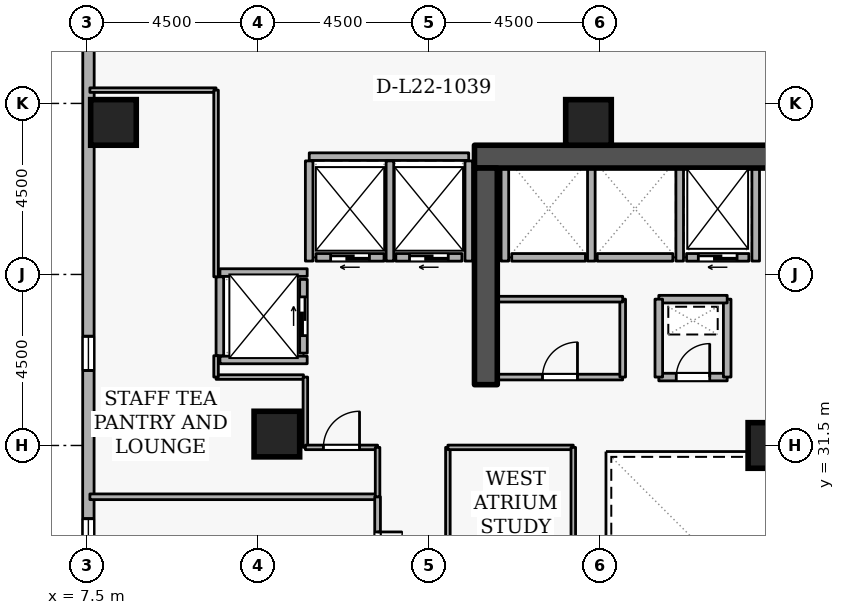
"""IFC4 building model, lengths in metres.
Left out: names, types, materials, properties, quantities, classifications, styles, units other than length and angle.
Written with IfcOpenShell. Run it as: python <this file> out.ifc"""

import sys

from ifc_helpers import new_model, si_unit, direction, frame, frame_2d, origin, origin_2d, place, context, subcontext, project, spatial, rectangle, extrude, element, fill, save


model = new_model("IFC4")
c1 = context("Model", 3, precision=1e-05, world=origin(), true_north=direction((0.0, 1.0)))
c2 = subcontext(c1, "Body", "Model", "MODEL_VIEW")
j1 = project(units=[si_unit("LENGTHUNIT", "METRE"), si_unit("PLANEANGLEUNIT", "RADIAN")], contexts=[c1])
p1 = place(None, origin())
s1 = spatial("IfcSite", under=j1, at=p1, CompositionType="ELEMENT")
p2 = place(p1, origin())
s2 = spatial("IfcBuilding", under=s1, at=p2, CompositionType="ELEMENT")
p3 = place(p2, frame((0.0, 0.0, 87.3)))
s3 = spatial("IfcBuildingStorey", under=s2, at=p3, CompositionType="ELEMENT", Elevation=87.3)
p4 = place(p3, frame((17.7, 39.1, 0.0), z_axis=(0.0, 0.0, 1.0), x_axis=(1.0, 0.0, 0.0)))
e1 = element("IfcWall", 1, at=p4, inside=s3, PredefinedType="SHEAR", context=c2, shape_type="SweptSolid", body=[
    extrude(rectangle(XDim=15.6, YDim=0.6, at=frame_2d((7.8, 0.0))), origin(), (0.0, 0.0, 1.0), 3.6),
])
p5 = place(p3, frame((18.0, 33.1, 0.0), z_axis=(0.0, 0.0, 1.0), x_axis=(0.0, 1.0, 0.0)))
e2 = element("IfcWall", 2, at=p5, inside=s3, PredefinedType="SHEAR", context=c2, shape_type="SweptSolid", body=[
    extrude(rectangle(XDim=5.7, YDim=0.6, at=frame_2d((2.85, 0.0))), origin(), (0.0, 0.0, 1.0), 3.6),
])
for number, where, z_axis, x_axis in (
    (3, (8.2, 40.0, 0.0), (0.0, 0.0, 1.0), (1.0, 0.0, 0.0)),
    (4, (12.5, 31.8, 0.0), (0.0, 0.0, 1.0), (1.0, 0.0, 0.0)),
    (5, (20.7, 40.0, 0.0), (0.0, 0.0, 1.0), (1.0, 0.0, 0.0)),
    (6, (25.5, 31.5, 0.0), (0.0, 0.0, 1.0), (1.0, 0.0, 0.0)),
):
    element("IfcColumn", number, at=place(p3, frame(where, z_axis=z_axis, x_axis=x_axis)), inside=s3, PredefinedType="COLUMN", context=c2, shape_type="SweptSolid", body=[
        extrude(rectangle(XDim=1.2, YDim=1.2, at=origin_2d()), origin(), (0.0, 0.0, 1.0), 3.6),
    ])
p6 = place(p3, frame((7.544, 45.774, 0.0), z_axis=(0.0, 0.0, 1.0), x_axis=(-0.000243032466, -0.999999970468, 0.0)))
e7 = element("IfcWall", 7, at=p6, inside=s3, PredefinedType="STANDARD", context=c2, shape_type="SweptSolid", body=[
    extrude(rectangle(XDim=34.155, YDim=0.3, at=frame_2d((17.078, 0.0))), origin(), (0.0, 0.0, 1.0), 2.7),
])
p7 = place(p6, frame((1.8, 0.0, 0.72)))
e8 = element("IfcOpeningElement", 8, at=p7, cuts=e7, PredefinedType="OPENING", context=c2, shape_type="SweptSolid", body=[
    extrude(rectangle(XDim=0.9, YDim=1.75, at=frame_2d((0.45, 0.875))), frame((0.0, 0.16, 0.0), z_axis=(0.0, -1.0, 0.0), x_axis=(1.0, 0.0, 0.0)), (0.0, 0.0, 1.0), 0.32),
])
p8 = place(p6, frame((11.4, 0.0, 0.72)))
e9 = element("IfcOpeningElement", 9, at=p8, cuts=e7, PredefinedType="OPENING", context=c2, shape_type="SweptSolid", body=[
    extrude(rectangle(XDim=0.9, YDim=1.75, at=frame_2d((0.45, 0.875))), frame((0.0, 0.16, 0.0), z_axis=(0.0, -1.0, 0.0), x_axis=(1.0, 0.0, 0.0)), (0.0, 0.0, 1.0), 0.32),
])
p9 = place(p6, frame((16.2, 0.0, 0.72)))
e10 = element("IfcOpeningElement", 10, at=p9, cuts=e7, PredefinedType="OPENING", context=c2, shape_type="SweptSolid", body=[
    extrude(rectangle(XDim=0.9, YDim=1.75, at=frame_2d((0.45, 0.875))), frame((0.0, 0.16, 0.0), z_axis=(0.0, -1.0, 0.0), x_axis=(1.0, 0.0, 0.0)), (0.0, 0.0, 1.0), 0.32),
])
p10 = place(p6, frame((21.0, 0.0, 0.72)))
e11 = element("IfcOpeningElement", 11, at=p10, cuts=e7, PredefinedType="OPENING", context=c2, shape_type="SweptSolid", body=[
    extrude(rectangle(XDim=0.9, YDim=1.75, at=frame_2d((0.45, 0.875))), frame((0.0, 0.16, 0.0), z_axis=(0.0, -1.0, 0.0), x_axis=(1.0, 0.0, 0.0)), (0.0, 0.0, 1.0), 0.32),
])
p11 = place(p6, frame((25.8, 0.0, 0.72)))
e12 = element("IfcOpeningElement", 12, at=p11, cuts=e7, PredefinedType="OPENING", context=c2, shape_type="SweptSolid", body=[
    extrude(rectangle(XDim=0.9, YDim=1.75, at=frame_2d((0.45, 0.875))), frame((0.0, 0.16, 0.0), z_axis=(0.0, -1.0, 0.0), x_axis=(1.0, 0.0, 0.0)), (0.0, 0.0, 1.0), 0.32),
])
p12 = place(p3, frame((24.92, 36.45, 0.0), z_axis=(0.0, 0.0, 1.0), x_axis=(-1.0, 0.0, 0.0)))
e13 = element("IfcWall", 13, at=p12, inside=s3, PredefinedType="STANDARD", context=c2, shape_type="SweptSolid", body=[
    extrude(rectangle(XDim=1.64, YDim=0.2, at=frame_2d((0.82, 0.0))), origin(), (0.0, 0.0, 1.0), 3.34),
])
p13 = place(p12, frame((0.31, 0.0, 0.0)))
e14 = element("IfcOpeningElement", 14, at=p13, cuts=e13, PredefinedType="OPENING", context=c2, shape_type="SweptSolid", body=[
    extrude(rectangle(XDim=1.02, YDim=2.06, at=frame_2d((0.51, 1.03))), frame((0.0, 0.11, 0.0), z_axis=(0.0, -1.0, 0.0), x_axis=(1.0, 0.0, 0.0)), (0.0, 0.0, 1.0), 0.22),
])
p14 = place(p3, frame((22.92, 36.45, 0.0), z_axis=(0.0, 0.0, 1.0), x_axis=(-1.0, 0.0, 0.0)))
e15 = element("IfcWall", 15, at=p14, inside=s3, PredefinedType="STANDARD", context=c2, shape_type="SweptSolid", body=[
    extrude(rectangle(XDim=1.99, YDim=0.2, at=frame_2d((0.995, 0.0))), origin(), (0.0, 0.0, 1.0), 3.34),
])
p15 = place(p3, frame((20.62, 36.45, 0.0), z_axis=(0.0, 0.0, 1.0), x_axis=(-1.0, 0.0, 0.0)))
e16 = element("IfcWall", 16, at=p15, inside=s3, PredefinedType="STANDARD", context=c2, shape_type="SweptSolid", body=[
    extrude(rectangle(XDim=1.94, YDim=0.2, at=frame_2d((0.97, 0.0))), origin(), (0.0, 0.0, 1.0), 3.34),
])
p16 = place(p3, frame((17.37, 36.45, 0.0), z_axis=(0.0, 0.0, 1.0), x_axis=(-1.0, 0.0, 0.0)))
e17 = element("IfcWall", 17, at=p16, inside=s3, PredefinedType="STANDARD", context=c2, shape_type="SweptSolid", body=[
    extrude(rectangle(XDim=1.74, YDim=0.2, at=frame_2d((0.87, 0.0))), origin(), (0.0, 0.0, 1.0), 3.34),
])
p17 = place(p16, frame((0.36, 0.0, 0.0)))
e18 = element("IfcOpeningElement", 18, at=p17, cuts=e17, PredefinedType="OPENING", context=c2, shape_type="SweptSolid", body=[
    extrude(rectangle(XDim=1.02, YDim=2.06, at=frame_2d((0.51, 1.03))), frame((0.0, 0.11, 0.0), z_axis=(0.0, -1.0, 0.0), x_axis=(1.0, 0.0, 0.0)), (0.0, 0.0, 1.0), 0.22),
])
p18 = place(p3, frame((15.32, 36.45, 0.0), z_axis=(0.0, 0.0, 1.0), x_axis=(-1.0, 0.0, 0.0)))
e19 = element("IfcWall", 19, at=p18, inside=s3, PredefinedType="STANDARD", context=c2, shape_type="SweptSolid", body=[
    extrude(rectangle(XDim=1.79, YDim=0.2, at=frame_2d((0.895, 0.0))), origin(), (0.0, 0.0, 1.0), 3.34),
])
p19 = place(p18, frame((0.385, 0.0, 0.0)))
e20 = element("IfcOpeningElement", 20, at=p19, cuts=e19, PredefinedType="OPENING", context=c2, shape_type="SweptSolid", body=[
    extrude(rectangle(XDim=1.02, YDim=2.06, at=frame_2d((0.51, 1.03))), frame((0.0, 0.11, 0.0), z_axis=(0.0, -1.0, 0.0), x_axis=(1.0, 0.0, 0.0)), (0.0, 0.0, 1.0), 0.22),
])
p20 = place(p3, frame((13.2, 33.93, 0.0), z_axis=(0.0, 0.0, 1.0), x_axis=(0.0, 1.0, 0.0)))
e21 = element("IfcWall", 21, at=p20, inside=s3, PredefinedType="STANDARD", context=c2, shape_type="SweptSolid", body=[
    extrude(rectangle(XDim=1.94, YDim=0.2, at=frame_2d((0.97, 0.0))), origin(), (0.0, 0.0, 1.0), 3.34),
])
p21 = place(p20, frame((0.46, 0.0, 0.0)))
e22 = element("IfcOpeningElement", 22, at=p21, cuts=e21, PredefinedType="OPENING", context=c2, shape_type="SweptSolid", body=[
    extrude(rectangle(XDim=1.02, YDim=2.06, at=frame_2d((0.51, 1.03))), frame((0.0, 0.11, 0.0), z_axis=(0.0, -1.0, 0.0), x_axis=(1.0, 0.0, 0.0)), (0.0, 0.0, 1.0), 0.22),
])
for number, where, z_axis, x_axis in (
    (23, (25.1, 36.352, 0.0), (0.0, 0.0, 1.0), (0.0, 1.0, 0.0)),
    (24, (23.1, 36.352, 0.0), (0.0, 0.0, 1.0), (0.0, 1.0, 0.0)),
    (25, (20.775, 36.352, 0.0), (0.0, 0.0, 1.0), (0.0, 1.0, 0.0)),
    (26, (18.5, 36.352, 0.0), (0.0, 0.0, 1.0), (0.0, 1.0, 0.0)),
):
    element("IfcWall", number, at=place(p3, frame(where, z_axis=z_axis, x_axis=x_axis)), inside=s3, PredefinedType="STANDARD", context=c2, shape_type="SweptSolid", body=[
        extrude(rectangle(XDim=2.436, YDim=0.2, at=frame_2d((1.218, 0.0))), origin(), (0.0, 0.0, 1.0), 3.34),
    ])
p22 = place(p3, frame((13.352, 39.1, 0.0), z_axis=(0.0, 0.0, 1.0), x_axis=(1.0, 0.0, 0.0)))
e27 = element("IfcWall", 27, at=p22, inside=s3, PredefinedType="STANDARD", context=c2, shape_type="SweptSolid", body=[
    extrude(rectangle(XDim=4.196, YDim=0.2, at=frame_2d((2.098, 0.0))), origin(), (0.0, 0.0, 1.0), 3.34),
])
p23 = place(p3, frame((17.55, 36.352, 0.0), z_axis=(0.0, 0.0, 1.0), x_axis=(0.0, 1.0, 0.0)))
e28 = element("IfcWall", 28, at=p23, inside=s3, PredefinedType="STANDARD", context=c2, shape_type="SweptSolid", body=[
    extrude(rectangle(XDim=2.636, YDim=0.2, at=frame_2d((1.318, 0.0))), origin(), (0.0, 0.0, 1.0), 2.545),
])
for number, where, z_axis, x_axis in (
    (29, (15.475, 36.352, 0.0), (0.0, 0.0, 1.0), (0.0, 1.0, 0.0)),
    (30, (13.35, 36.352, 0.0), (0.0, 0.0, 1.0), (0.0, 1.0, 0.0)),
):
    element("IfcWall", number, at=place(p3, frame(where, z_axis=z_axis, x_axis=x_axis)), inside=s3, PredefinedType="STANDARD", context=c2, shape_type="SweptSolid", body=[
        extrude(rectangle(XDim=2.636, YDim=0.2, at=frame_2d((1.318, 0.0))), origin(), (0.0, 0.0, 1.0), 3.34),
    ])
for number, where, z_axis, x_axis in (
    (31, (11.002, 36.05, 0.0), (0.0, 0.0, 1.0), (1.0, 0.0, 0.0)),
    (32, (11.002, 33.75, 0.0), (0.0, 0.0, 1.0), (1.0, 0.0, 0.0)),
):
    element("IfcWall", number, at=place(p3, frame(where, z_axis=z_axis, x_axis=x_axis)), inside=s3, PredefinedType="STANDARD", context=c2, shape_type="SweptSolid", body=[
        extrude(rectangle(XDim=2.296, YDim=0.2, at=frame_2d((1.148, 0.0))), origin(), (0.0, 0.0, 1.0), 3.34),
    ])
p24 = place(p3, frame((11.0, 33.862, 0.0), z_axis=(0.0, 0.0, 1.0), x_axis=(0.0, 1.0, 0.0)))
e33 = element("IfcWall", 33, at=p24, inside=s3, PredefinedType="STANDARD", context=c2, shape_type="SweptSolid", body=[
    extrude(rectangle(XDim=2.076, YDim=0.2, at=frame_2d((1.038, 0.0))), origin(), (0.0, 0.0, 1.0), 3.34),
])
p25 = place(p3, frame((22.55, 33.3, 0.0), z_axis=(0.0, 0.0, 1.0), x_axis=(1.0, 0.0, 0.0)))
e34 = element("IfcWall", 34, at=p25, inside=s3, PredefinedType="STANDARD", context=c2, shape_type="SweptSolid", body=[
    extrude(rectangle(XDim=1.8, YDim=0.2, at=frame_2d((0.9, 0.0))), origin(), (0.0, 0.0, 1.0), 3.34),
])
p26 = place(p25, frame((0.46, 0.0, 0.0)))
e35 = element("IfcOpeningElement", 35, at=p26, cuts=e34, PredefinedType="OPENING", context=c2, shape_type="SweptSolid", body=[
    extrude(rectangle(XDim=0.88, YDim=2.04, at=frame_2d((0.44, 1.02))), frame((0.0, 0.11, 0.0), z_axis=(0.0, -1.0, 0.0), x_axis=(1.0, 0.0, 0.0)), (0.0, 0.0, 1.0), 0.22),
])
p27 = place(p3, frame((24.35, 33.3, 0.0), z_axis=(0.0, 0.0, 1.0), x_axis=(0.0, 1.0, 0.0)))
e36 = element("IfcWall", 36, at=p27, inside=s3, PredefinedType="STANDARD", context=c2, shape_type="SweptSolid", body=[
    extrude(rectangle(XDim=2.05, YDim=0.2, at=frame_2d((1.025, 0.0))), origin(), (0.0, 0.0, 1.0), 3.34),
])
p28 = place(p3, frame((24.35, 35.35, 0.0), z_axis=(0.0, 0.0, 1.0), x_axis=(-1.0, 0.0, 0.0)))
e37 = element("IfcWall", 37, at=p28, inside=s3, PredefinedType="STANDARD", context=c2, shape_type="SweptSolid", body=[
    extrude(rectangle(XDim=1.8, YDim=0.2, at=frame_2d((0.9, 0.0))), origin(), (0.0, 0.0, 1.0), 3.34),
])
p29 = place(p3, frame((22.55, 35.35, 0.0), z_axis=(0.0, 0.0, 1.0), x_axis=(0.0, -1.0, 0.0)))
e38 = element("IfcWall", 38, at=p29, inside=s3, PredefinedType="STANDARD", context=c2, shape_type="SweptSolid", body=[
    extrude(rectangle(XDim=2.05, YDim=0.2, at=frame_2d((1.025, 0.0))), origin(), (0.0, 0.0, 1.0), 3.34),
])
p30 = place(p3, frame((18.3, 33.3, 0.0), z_axis=(0.0, 0.0, 1.0), x_axis=(1.0, 0.0, 0.0)))
e39 = element("IfcWall", 39, at=p30, inside=s3, PredefinedType="PARTITIONING", context=c2, shape_type="SweptSolid", body=[
    extrude(rectangle(XDim=3.3, YDim=0.15, at=frame_2d((1.65, 0.0))), origin(), (0.0, 0.0, 1.0), 3.34),
])
p31 = place(p30, frame((1.19, 0.0, 0.0)))
e40 = element("IfcOpeningElement", 40, at=p31, cuts=e39, PredefinedType="OPENING", context=c2, shape_type="SweptSolid", body=[
    extrude(rectangle(XDim=0.92, YDim=2.08, at=frame_2d((0.46, 1.04))), frame((0.0, 0.085, 0.0), z_axis=(0.0, -1.0, 0.0), x_axis=(1.0, 0.0, 0.0)), (0.0, 0.0, 1.0), 0.17),
])
p32 = place(p3, frame((21.6, 33.3, 0.0), z_axis=(0.0, 0.0, 1.0), x_axis=(0.0, 1.0, 0.0)))
e41 = element("IfcWall", 41, at=p32, inside=s3, PredefinedType="PARTITIONING", context=c2, shape_type="SweptSolid", body=[
    extrude(rectangle(XDim=2.05, YDim=0.15, at=frame_2d((1.025, 0.0))), origin(), (0.0, 0.0, 1.0), 3.34),
])
p33 = place(p3, frame((21.6, 35.35, 0.0), z_axis=(0.0, 0.0, 1.0), x_axis=(-1.0, 0.0, 0.0)))
e42 = element("IfcWall", 42, at=p33, inside=s3, PredefinedType="PARTITIONING", context=c2, shape_type="SweptSolid", body=[
    extrude(rectangle(XDim=3.3, YDim=0.15, at=frame_2d((1.65, 0.0))), origin(), (0.0, 0.0, 1.0), 3.34),
])
p34 = place(p3, frame((7.58, 30.15, 0.0), z_axis=(0.0, 0.0, 1.0), x_axis=(1.0, 0.0, 0.0)))
e43 = element("IfcWall", 43, at=p34, inside=s3, PredefinedType="PARTITIONING", context=c2, shape_type="SweptSolid", body=[
    extrude(rectangle(XDim=7.57, YDim=0.15, at=frame_2d((3.785, 0.0))), origin(), (0.0, 0.0, 1.0), 3.34),
])
p35 = place(p3, frame((15.15, 30.15, 0.0), z_axis=(0.0, 0.0, 1.0), x_axis=(0.0, -1.0, 0.0)))
e44 = element("IfcWall", 44, at=p35, inside=s3, PredefinedType="PARTITIONING", context=c2, shape_type="SweptSolid", body=[
    extrude(rectangle(XDim=3.15, YDim=0.15, at=frame_2d((1.575, 0.0))), origin(), (0.0, 0.0, 1.0), 3.34),
])
p36 = place(p35, frame((0.925, 0.0, 0.0)))
e45 = element("IfcOpeningElement", 45, at=p36, cuts=e44, PredefinedType="OPENING", context=c2, shape_type="SweptSolid", body=[
    extrude(rectangle(XDim=1.3, YDim=2.12, at=frame_2d((0.65, 1.06))), frame((0.0, 0.085, 0.0), z_axis=(0.0, -1.0, 0.0), x_axis=(1.0, 0.0, 0.0)), (0.0, 0.0, 1.0), 0.17),
])
p37 = place(p3, frame((10.9, 33.3, 0.0), z_axis=(0.0, 0.0, 1.0), x_axis=(1.0, 0.0, 0.0)))
e46 = element("IfcWall", 46, at=p37, inside=s3, PredefinedType="PARTITIONING", context=c2, shape_type="SweptSolid", body=[
    extrude(rectangle(XDim=2.3, YDim=0.12, at=frame_2d((1.15, 0.0))), origin(), (0.0, 0.0, 1.0), 3.34),
])
p38 = place(p3, frame((13.25, 33.3, 0.0), z_axis=(0.0, 0.0, 1.0), x_axis=(0.0, -1.0, 0.0)))
e47 = element("IfcWall", 47, at=p38, inside=s3, PredefinedType="PARTITIONING", context=c2, shape_type="SweptSolid", body=[
    extrude(rectangle(XDim=1.85, YDim=0.12, at=frame_2d((0.925, 0.0))), origin(), (0.0, 0.0, 1.0), 3.34),
])
p39 = place(p3, frame((13.25, 31.45, 0.0), z_axis=(0.0, 0.0, 1.0), x_axis=(1.0, 0.0, 0.0)))
e48 = element("IfcWall", 48, at=p39, inside=s3, PredefinedType="PARTITIONING", context=c2, shape_type="SweptSolid", body=[
    extrude(rectangle(XDim=1.9, YDim=0.12, at=frame_2d((0.95, 0.0))), origin(), (0.0, 0.0, 1.0), 3.34),
])
p40 = place(p39, frame((0.475, 0.0, 0.0)))
e49 = element("IfcOpeningElement", 49, at=p40, cuts=e48, PredefinedType="OPENING", context=c2, shape_type="SweptSolid", body=[
    extrude(rectangle(XDim=0.95, YDim=2.1, at=frame_2d((0.475, 1.05))), frame((0.0, 0.07, 0.0), z_axis=(0.0, -1.0, 0.0), x_axis=(1.0, 0.0, 0.0)), (0.0, 0.0, 1.0), 0.14),
])
p41 = place(p3, frame((15.15, 31.45, 0.0), z_axis=(0.0, 0.0, 1.0), x_axis=(0.0, -1.0, 0.0)))
e50 = element("IfcWall", 50, at=p41, inside=s3, PredefinedType="PARTITIONING", context=c2, shape_type="SweptSolid", body=[
    extrude(rectangle(XDim=1.3, YDim=0.12, at=frame_2d((0.65, 0.0))), origin(), (0.0, 0.0, 1.0), 3.34),
])
p42 = place(p3, frame((7.58, 40.85, 0.0), z_axis=(0.0, 0.0, 1.0), x_axis=(1.0, 0.0, 0.0)))
e51 = element("IfcWall", 51, at=p42, inside=s3, PredefinedType="PARTITIONING", context=c2, shape_type="SweptSolid", body=[
    extrude(rectangle(XDim=3.32, YDim=0.12, at=frame_2d((1.66, 0.0))), origin(), (0.0, 0.0, 1.0), 3.34),
])
p43 = place(p3, frame((10.9, 40.85, 0.0), z_axis=(0.0, 0.0, 1.0), x_axis=(0.0, -1.0, 0.0)))
e52 = element("IfcWall", 52, at=p43, inside=s3, PredefinedType="PARTITIONING", context=c2, shape_type="SweptSolid", body=[
    extrude(rectangle(XDim=4.912, YDim=0.12, at=frame_2d((2.456, 0.0))), origin(), (0.0, 0.0, 1.0), 3.34),
])
p44 = place(p3, frame((10.9, 33.862, 0.0), z_axis=(0.0, 0.0, 1.0), x_axis=(0.0, -1.0, 0.0)))
e53 = element("IfcWall", 53, at=p44, inside=s3, PredefinedType="PARTITIONING", context=c2, shape_type="SweptSolid", body=[
    extrude(rectangle(XDim=0.562, YDim=0.12, at=frame_2d((0.281, 0.0))), origin(), (0.0, 0.0, 1.0), 3.34),
])
p45 = place(p3, frame((17.0, 22.55, 0.0), z_axis=(0.0, 0.0, 1.0), x_axis=(0.0, 1.0, 0.0)))
e54 = element("IfcWall", 54, at=p45, inside=s3, PredefinedType="PARTITIONING", context=c2, shape_type="SweptSolid", body=[
    extrude(rectangle(XDim=8.9, YDim=0.12, at=frame_2d((4.45, 0.0))), origin(), (0.0, 0.0, 1.0), 3.34),
])
p46 = place(p45, frame((3.975, 0.0, 0.0)))
e55 = element("IfcOpeningElement", 55, at=p46, cuts=e54, PredefinedType="OPENING", context=c2, shape_type="SweptSolid", body=[
    extrude(rectangle(XDim=0.95, YDim=2.1, at=frame_2d((0.475, 1.05))), frame((0.0, 0.07, 0.0), z_axis=(0.0, -1.0, 0.0), x_axis=(1.0, 0.0, 0.0)), (0.0, 0.0, 1.0), 0.14),
])
p47 = place(p3, frame((17.0, 31.45, 0.0), z_axis=(0.0, 0.0, 1.0), x_axis=(1.0, 0.0, 0.0)))
e56 = element("IfcWall", 56, at=p47, inside=s3, PredefinedType="PARTITIONING", context=c2, shape_type="SweptSolid", body=[
    extrude(rectangle(XDim=3.3, YDim=0.12, at=frame_2d((1.65, 0.0))), origin(), (0.0, 0.0, 1.0), 3.34),
])
p48 = place(p3, frame((20.3, 31.45, 0.0), z_axis=(0.0, 0.0, 1.0), x_axis=(0.0, -1.0, 0.0)))
e57 = element("IfcWall", 57, at=p48, inside=s3, PredefinedType="PARTITIONING", context=c2, shape_type="SweptSolid", body=[
    extrude(rectangle(XDim=8.9, YDim=0.12, at=frame_2d((4.45, 0.0))), origin(), (0.0, 0.0, 1.0), 3.34),
])
p49 = place(p8, origin())
e58 = element("IfcWindow", 58, at=p49, inside=s3, PartitioningType="SINGLE_PANEL", PredefinedType="WINDOW", context=c2, shape_type="SweptSolid", body=[
    extrude(rectangle(XDim=0.9, YDim=1.75, at=frame_2d((0.45, 0.875))), frame((0.0, 0.03, 0.0), z_axis=(0.0, -1.0, 0.0), x_axis=(1.0, 0.0, 0.0)), (0.0, 0.0, 1.0), 0.06),
])
fill(e9, e58)
p50 = place(p9, origin())
e59 = element("IfcWindow", 59, at=p50, inside=s3, PartitioningType="SINGLE_PANEL", PredefinedType="WINDOW", context=c2, shape_type="SweptSolid", body=[
    extrude(rectangle(XDim=0.9, YDim=1.75, at=frame_2d((0.45, 0.875))), frame((0.0, 0.03, 0.0), z_axis=(0.0, -1.0, 0.0), x_axis=(1.0, 0.0, 0.0)), (0.0, 0.0, 1.0), 0.06),
])
fill(e10, e59)
p51 = place(p13, origin())
e60 = element("IfcDoor", 60, at=p51, inside=s3, OperationType="SLIDING_TO_LEFT", PredefinedType="DOOR", context=c2, shape_type="SweptSolid", body=[
    extrude(rectangle(XDim=1.02, YDim=2.06, at=frame_2d((0.51, 1.03))), frame((0.0, 0.025, 0.0), z_axis=(0.0, -1.0, 0.0), x_axis=(1.0, 0.0, 0.0)), (0.0, 0.0, 1.0), 0.05),
])
fill(e14, e60)
p52 = place(p17, origin())
e61 = element("IfcDoor", 61, at=p52, inside=s3, OperationType="SLIDING_TO_LEFT", PredefinedType="DOOR", context=c2, shape_type="SweptSolid", body=[
    extrude(rectangle(XDim=1.02, YDim=2.06, at=frame_2d((0.51, 1.03))), frame((0.0, 0.025, 0.0), z_axis=(0.0, -1.0, 0.0), x_axis=(1.0, 0.0, 0.0)), (0.0, 0.0, 1.0), 0.05),
])
fill(e18, e61)
p53 = place(p19, origin())
e62 = element("IfcDoor", 62, at=p53, inside=s3, OperationType="SLIDING_TO_LEFT", PredefinedType="DOOR", context=c2, shape_type="SweptSolid", body=[
    extrude(rectangle(XDim=1.02, YDim=2.06, at=frame_2d((0.51, 1.03))), frame((0.0, 0.025, 0.0), z_axis=(0.0, -1.0, 0.0), x_axis=(1.0, 0.0, 0.0)), (0.0, 0.0, 1.0), 0.05),
])
fill(e20, e62)
p54 = place(p21, origin())
e63 = element("IfcDoor", 63, at=p54, inside=s3, OperationType="SLIDING_TO_LEFT", PredefinedType="DOOR", context=c2, shape_type="SweptSolid", body=[
    extrude(rectangle(XDim=1.02, YDim=2.06, at=frame_2d((0.51, 1.03))), frame((0.0, 0.025, 0.0), z_axis=(0.0, -1.0, 0.0), x_axis=(1.0, 0.0, 0.0)), (0.0, 0.0, 1.0), 0.05),
])
fill(e22, e63)
p55 = place(p26, origin())
e64 = element("IfcDoor", 64, at=p55, inside=s3, OperationType="SINGLE_SWING_RIGHT", PredefinedType="DOOR", context=c2, shape_type="SweptSolid", body=[
    extrude(rectangle(XDim=0.88, YDim=2.04, at=frame_2d((0.44, 1.02))), frame((0.0, 0.025, 0.0), z_axis=(0.0, -1.0, 0.0), x_axis=(1.0, 0.0, 0.0)), (0.0, 0.0, 1.0), 0.05),
])
fill(e35, e64)
p56 = place(p31, origin())
e65 = element("IfcDoor", 65, at=p56, inside=s3, OperationType="SINGLE_SWING_RIGHT", PredefinedType="DOOR", context=c2, shape_type="SweptSolid", body=[
    extrude(rectangle(XDim=0.92, YDim=2.08, at=frame_2d((0.46, 1.04))), frame((0.0, 0.025, 0.0), z_axis=(0.0, -1.0, 0.0), x_axis=(1.0, 0.0, 0.0)), (0.0, 0.0, 1.0), 0.05),
])
fill(e40, e65)
p57 = place(p36, origin())
e66 = element("IfcDoor", 66, at=p57, inside=s3, OperationType="DOUBLE_DOOR_SINGLE_SWING", PredefinedType="DOOR", context=c2, shape_type="SweptSolid", body=[
    extrude(rectangle(XDim=1.3, YDim=2.12, at=frame_2d((0.65, 1.06))), frame((0.0, 0.025, 0.0), z_axis=(0.0, -1.0, 0.0), x_axis=(1.0, 0.0, 0.0)), (0.0, 0.0, 1.0), 0.05),
])
fill(e45, e66)
p58 = place(p40, origin())
e67 = element("IfcDoor", 67, at=p58, inside=s3, OperationType="SINGLE_SWING_RIGHT", PredefinedType="DOOR", context=c2, shape_type="SweptSolid", body=[
    extrude(rectangle(XDim=0.95, YDim=2.1, at=frame_2d((0.475, 1.05))), frame((0.0, 0.025, 0.0), z_axis=(0.0, -1.0, 0.0), x_axis=(1.0, 0.0, 0.0)), (0.0, 0.0, 1.0), 0.05),
])
fill(e49, e67)
save(model, sys.argv[1])
